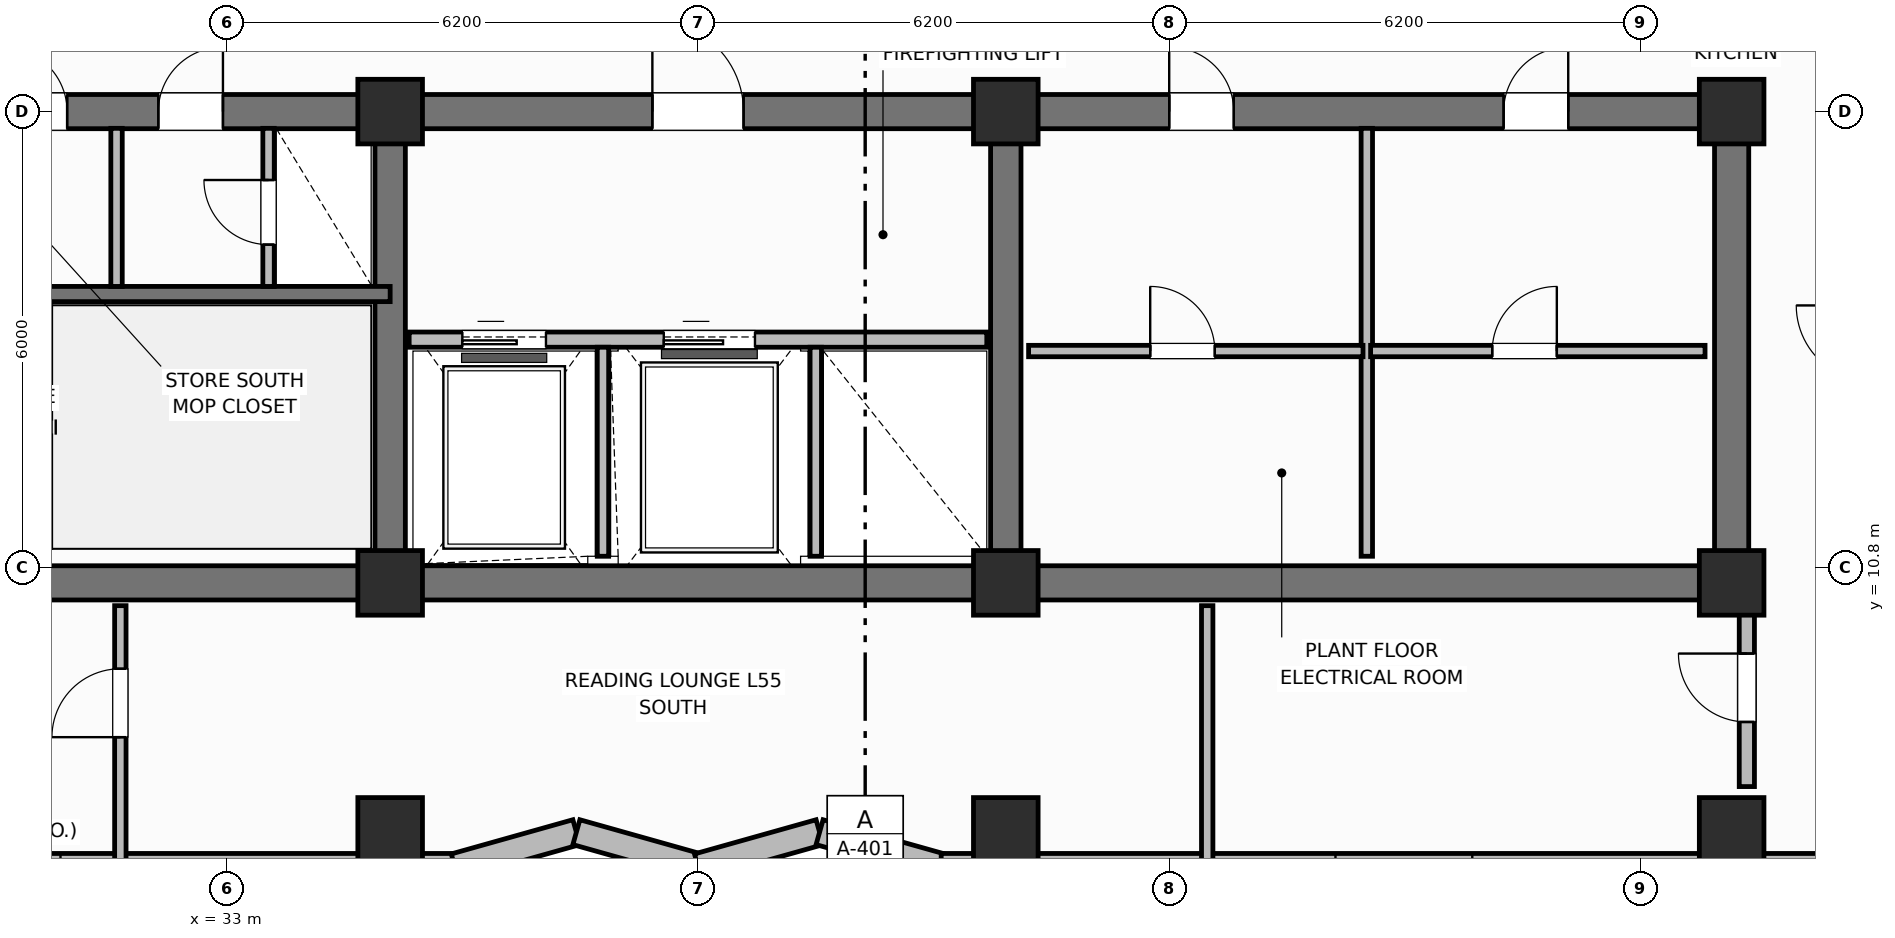
"""IFC4 building model, lengths in metres.
Left out: names, types, materials, properties, quantities, classifications, styles, units other than length and angle.
Written with IfcOpenShell. Run it as: python <this file> out.ifc"""

import sys

from ifc_helpers import new_model, si_unit, direction, frame, frame_2d, origin, origin_2d, place, context, subcontext, project, spatial, rectangle, extrude, element, fill, save


model = new_model("IFC4")
c1 = context("Model", 3, precision=1e-05, world=origin(), true_north=direction((0.0, 1.0)))
c2 = subcontext(c1, "Body", "Model", "MODEL_VIEW")
j1 = project(units=[si_unit("LENGTHUNIT", "METRE"), si_unit("PLANEANGLEUNIT", "RADIAN")], contexts=[c1])
p1 = place(None, origin())
s1 = spatial("IfcSite", under=j1, at=p1, CompositionType="ELEMENT")
p2 = place(p1, origin())
s2 = spatial("IfcBuilding", under=s1, at=p2, CompositionType="ELEMENT")
p3 = place(p2, frame((0.0, 0.0, 222.1)))
s3 = spatial("IfcBuildingStorey", under=s2, at=p3, CompositionType="ELEMENT", Elevation=222.1)
p4 = place(p3, frame((52.8, 10.6, 0.0), z_axis=(0.0, 0.0, 1.0), x_axis=(-1.0, 0.0, 0.0)))
e1 = element("IfcWall", 1, at=p4, inside=s3, PredefinedType="SHEAR", context=c2, shape_type="SweptSolid", body=[
    extrude(rectangle(XDim=27.2, YDim=0.45, at=frame_2d((13.6, 0.0))), origin(), (0.0, 0.0, 1.0), 3.7),
])
p5 = place(p3, frame((52.8, 10.825, 0.0), z_axis=(0.0, 0.0, 1.0), x_axis=(0.0, 1.0, 0.0)))
e2 = element("IfcWall", 2, at=p5, inside=s3, PredefinedType="SHEAR", context=c2, shape_type="SweptSolid", body=[
    extrude(rectangle(XDim=5.75, YDim=0.45, at=frame_2d((2.875, 0.0))), origin(), (0.0, 0.0, 1.0), 3.7),
])
p6 = place(p3, frame((25.6, 16.8, 0.0), z_axis=(0.0, 0.0, 1.0), x_axis=(1.0, 0.0, 0.0)))
e3 = element("IfcWall", 3, at=p6, inside=s3, PredefinedType="SHEAR", context=c2, shape_type="SweptSolid", body=[
    extrude(rectangle(XDim=27.2, YDim=0.45, at=frame_2d((13.6, 0.0))), origin(), (0.0, 0.0, 1.0), 3.7),
])
p7 = place(p6, frame((1.7, 0.0, 0.0)))
e4 = element("IfcOpeningElement", 4, at=p7, cuts=e3, PredefinedType="OPENING", context=c2, shape_type="SweptSolid", body=[
    extrude(rectangle(XDim=1.1, YDim=2.15, at=frame_2d((0.55, 1.075))), frame((0.0, 0.235, 0.0), z_axis=(0.0, -1.0, 0.0), x_axis=(1.0, 0.0, 0.0)), (0.0, 0.0, 1.0), 0.47),
])
p8 = place(p6, frame((4.45, 0.0, 0.0)))
e5 = element("IfcOpeningElement", 5, at=p8, cuts=e3, PredefinedType="OPENING", context=c2, shape_type="SweptSolid", body=[
    extrude(rectangle(XDim=0.85, YDim=2.1, at=frame_2d((0.425, 1.05))), frame((0.0, 0.235, 0.0), z_axis=(0.0, -1.0, 0.0), x_axis=(1.0, 0.0, 0.0)), (0.0, 0.0, 1.0), 0.47),
])
p9 = place(p6, frame((6.5, 0.0, 0.0)))
e6 = element("IfcOpeningElement", 6, at=p9, cuts=e3, PredefinedType="OPENING", context=c2, shape_type="SweptSolid", body=[
    extrude(rectangle(XDim=0.85, YDim=2.1, at=frame_2d((0.425, 1.05))), frame((0.0, 0.235, 0.0), z_axis=(0.0, -1.0, 0.0), x_axis=(1.0, 0.0, 0.0)), (0.0, 0.0, 1.0), 0.47),
])
p10 = place(p6, frame((13.0, 0.0, 0.0)))
e7 = element("IfcOpeningElement", 7, at=p10, cuts=e3, PredefinedType="OPENING", context=c2, shape_type="SweptSolid", body=[
    extrude(rectangle(XDim=1.2, YDim=2.15, at=frame_2d((0.6, 1.075))), frame((0.0, 0.235, 0.0), z_axis=(0.0, -1.0, 0.0), x_axis=(1.0, 0.0, 0.0)), (0.0, 0.0, 1.0), 0.47),
])
p11 = place(p6, frame((19.8, 0.0, 0.0)))
e8 = element("IfcOpeningElement", 8, at=p11, cuts=e3, PredefinedType="OPENING", context=c2, shape_type="SweptSolid", body=[
    extrude(rectangle(XDim=0.85, YDim=2.1, at=frame_2d((0.425, 1.05))), frame((0.0, 0.235, 0.0), z_axis=(0.0, -1.0, 0.0), x_axis=(1.0, 0.0, 0.0)), (0.0, 0.0, 1.0), 0.47),
])
p12 = place(p6, frame((24.2, 0.0, 0.0)))
e9 = element("IfcOpeningElement", 9, at=p12, cuts=e3, PredefinedType="OPENING", context=c2, shape_type="SweptSolid", body=[
    extrude(rectangle(XDim=0.85, YDim=2.1, at=frame_2d((0.425, 1.05))), frame((0.0, 0.235, 0.0), z_axis=(0.0, -1.0, 0.0), x_axis=(1.0, 0.0, 0.0)), (0.0, 0.0, 1.0), 0.47),
])
for number, where, z_axis, x_axis in (
    (10, (35.15, 10.825, 0.0), (0.0, 0.0, 1.0), (0.0, 1.0, 0.0)),
    (11, (43.25, 10.825, 0.0), (0.0, 0.0, 1.0), (0.0, 1.0, 0.0)),
):
    element("IfcWall", number, at=place(p3, frame(where, z_axis=z_axis, x_axis=x_axis)), inside=s3, PredefinedType="SHEAR", context=c2, shape_type="SweptSolid", body=[
        extrude(rectangle(XDim=5.75, YDim=0.4, at=frame_2d((2.875, 0.0))), origin(), (0.0, 0.0, 1.0), 3.7),
    ])
for number, where, z_axis, x_axis in (
    (12, (35.15, 10.6, 0.0), (0.0, 0.0, 1.0), (1.0, 0.0, 0.0)),
    (13, (35.15, 16.8, 0.0), (0.0, 0.0, 1.0), (1.0, 0.0, 0.0)),
    (14, (43.25, 10.6, 0.0), (0.0, 0.0, 1.0), (1.0, 0.0, 0.0)),
    (15, (43.25, 16.8, 0.0), (0.0, 0.0, 1.0), (1.0, 0.0, 0.0)),
    (16, (52.8, 10.6, 0.0), (0.0, 0.0, 1.0), (1.0, 0.0, 0.0)),
    (17, (52.8, 16.8, 0.0), (0.0, 0.0, 1.0), (1.0, 0.0, 0.0)),
    (18, (35.15, 7.35, 0.0), (0.0, 0.0, 1.0), (1.0, 0.0, 0.0)),
    (19, (43.25, 7.35, 0.0), (0.0, 0.0, 1.0), (1.0, 0.0, 0.0)),
    (20, (52.8, 7.35, 0.0), (0.0, 0.0, 1.0), (1.0, 0.0, 0.0)),
):
    element("IfcColumn", number, at=place(p3, frame(where, z_axis=z_axis, x_axis=x_axis)), inside=s3, PredefinedType="COLUMN", context=c2, shape_type="SweptSolid", body=[
        extrude(rectangle(XDim=0.85, YDim=0.85, at=origin_2d()), origin(), (0.0, 0.0, 1.0), 3.7),
    ])
p13 = place(p3, frame((20.2, 6.87, 0.0), z_axis=(0.0, 0.0, 1.0), x_axis=(1.0, 0.0, 0.0)))
e21 = element("IfcWall", 21, at=p13, inside=s3, PredefinedType="SOLIDWALL", context=c2, shape_type="SweptSolid", body=[
    extrude(rectangle(XDim=15.8, YDim=0.34, at=frame_2d((7.9, 0.0))), origin(), (0.0, 0.0, 1.0), 2.26),
])
p14 = place(p13, frame((8.812, 0.0, 0.3)))
e22 = element("IfcOpeningElement", 22, at=p14, cuts=e21, PredefinedType="OPENING", context=c2, shape_type="SweptSolid", body=[
    extrude(rectangle(XDim=1.8, YDim=1.85, at=frame_2d((0.9, 0.925))), frame((0.0, 0.18, 0.0), z_axis=(0.0, -1.0, 0.0), x_axis=(1.0, 0.0, 0.0)), (0.0, 0.0, 1.0), 0.36),
])
p15 = place(p3, frame((36.0, 6.87, 0.0), z_axis=(0.0, 0.0, 1.0), x_axis=(0.962662902433, 0.270703040766, 0.0)))
e23 = element("IfcWall", 23, at=p15, inside=s3, PredefinedType="SOLIDWALL", context=c2, shape_type="SweptSolid", body=[
    extrude(rectangle(XDim=1.662, YDim=0.34, at=frame_2d((0.831, 0.0))), origin(), (0.0, 0.0, 1.0), 2.26),
])
p16 = place(p3, frame((37.6, 7.32, 0.0), z_axis=(0.0, 0.0, 1.0), x_axis=(0.962652136636, -0.270741322725, 0.0)))
e24 = element("IfcWall", 24, at=p16, inside=s3, PredefinedType="SOLIDWALL", context=c2, shape_type="SweptSolid", body=[
    extrude(rectangle(XDim=1.662, YDim=0.34, at=frame_2d((0.831, 0.0))), origin(), (0.0, 0.0, 1.0), 2.26),
])
p17 = place(p3, frame((39.2, 6.87, 0.0), z_axis=(0.0, 0.0, 1.0), x_axis=(0.962662902433, 0.270703040766, 0.0)))
e25 = element("IfcWall", 25, at=p17, inside=s3, PredefinedType="SOLIDWALL", context=c2, shape_type="SweptSolid", body=[
    extrude(rectangle(XDim=1.662, YDim=0.34, at=frame_2d((0.831, 0.0))), origin(), (0.0, 0.0, 1.0), 2.26),
])
p18 = place(p3, frame((40.8, 7.32, 0.0), z_axis=(0.0, 0.0, 1.0), x_axis=(0.962652136636, -0.270741322725, 0.0)))
e26 = element("IfcWall", 26, at=p18, inside=s3, PredefinedType="SOLIDWALL", context=c2, shape_type="SweptSolid", body=[
    extrude(rectangle(XDim=1.662, YDim=0.34, at=frame_2d((0.831, 0.0))), origin(), (0.0, 0.0, 1.0), 2.26),
])
p19 = place(p3, frame((42.4, 6.87, 0.0), z_axis=(0.0, 0.0, 1.0), x_axis=(1.0, 0.0, 0.0)))
e27 = element("IfcWall", 27, at=p19, inside=s3, PredefinedType="SOLIDWALL", context=c2, shape_type="SweptSolid", body=[
    extrude(rectangle(XDim=15.8, YDim=0.34, at=frame_2d((7.9, 0.0))), origin(), (0.0, 0.0, 1.0), 2.26),
])
p20 = place(p19, frame((5.188, 0.0, 0.3)))
e28 = element("IfcOpeningElement", 28, at=p20, cuts=e27, PredefinedType="OPENING", context=c2, shape_type="SweptSolid", body=[
    extrude(rectangle(XDim=1.8, YDim=1.85, at=frame_2d((0.9, 0.925))), frame((0.0, 0.18, 0.0), z_axis=(0.0, -1.0, 0.0), x_axis=(1.0, 0.0, 0.0)), (0.0, 0.0, 1.0), 0.36),
])
p21 = place(p19, frame((12.788, 0.0, 0.3)))
e29 = element("IfcOpeningElement", 29, at=p21, cuts=e27, PredefinedType="OPENING", context=c2, shape_type="SweptSolid", body=[
    extrude(rectangle(XDim=1.8, YDim=1.85, at=frame_2d((0.9, 0.925))), frame((0.0, 0.18, 0.0), z_axis=(0.0, -1.0, 0.0), x_axis=(1.0, 0.0, 0.0)), (0.0, 0.0, 1.0), 0.36),
])
p22 = place(p3, frame((25.6, 14.4, 0.0), z_axis=(0.0, 0.0, 1.0), x_axis=(1.0, 0.0, 0.0)))
e30 = element("IfcWall", 30, at=p22, inside=s3, PredefinedType="SHEAR", context=c2, shape_type="SweptSolid", body=[
    extrude(rectangle(XDim=9.55, YDim=0.2, at=frame_2d((4.775, 0.0))), origin(), (0.0, 0.0, 1.0), 3.7),
])
p23 = place(p22, frame((1.05, 0.0, 0.0)))
e31 = element("IfcOpeningElement", 31, at=p23, cuts=e30, PredefinedType="OPENING", context=c2, shape_type="SweptSolid", body=[
    extrude(rectangle(XDim=1.1, YDim=2.15, at=frame_2d((0.55, 1.075))), frame((0.0, 0.11, 0.0), z_axis=(0.0, -1.0, 0.0), x_axis=(1.0, 0.0, 0.0)), (0.0, 0.0, 1.0), 0.22),
])
p24 = place(p3, frame((31.55, 14.5, 0.0), z_axis=(0.0, 0.0, 1.0), x_axis=(0.0, 1.0, 0.0)))
e32 = element("IfcWall", 32, at=p24, inside=s3, PredefinedType="PARTITIONING", context=c2, shape_type="SweptSolid", body=[
    extrude(rectangle(XDim=2.08, YDim=0.15, at=frame_2d((1.04, 0.0))), origin(), (0.0, 0.0, 1.0), 2.24),
])
p25 = place(p3, frame((33.55, 14.5, 0.0), z_axis=(0.0, 0.0, 1.0), x_axis=(0.0, 1.0, 0.0)))
e33 = element("IfcWall", 33, at=p25, inside=s3, PredefinedType="PARTITIONING", context=c2, shape_type="SweptSolid", body=[
    extrude(rectangle(XDim=2.08, YDim=0.15, at=frame_2d((1.04, 0.0))), origin(), (0.0, 0.0, 1.0), 2.24),
])
p26 = place(p25, frame((0.55, 0.0, 0.0)))
e34 = element("IfcOpeningElement", 34, at=p26, cuts=e33, PredefinedType="OPENING", context=c2, shape_type="SweptSolid", body=[
    extrude(rectangle(XDim=0.85, YDim=2.05, at=frame_2d((0.425, 1.025))), frame((0.0, 0.085, 0.0), z_axis=(0.0, -1.0, 0.0), x_axis=(1.0, 0.0, 0.0)), (0.0, 0.0, 1.0), 0.17),
])
p27 = place(p3, frame((35.4, 13.8, 0.0), z_axis=(0.0, 0.0, 1.0), x_axis=(1.0, 0.0, 0.0)))
e35 = element("IfcWall", 35, at=p27, inside=s3, PredefinedType="PARTITIONING", context=c2, shape_type="SweptSolid", body=[
    extrude(rectangle(XDim=7.6, YDim=0.2, at=frame_2d((3.8, 0.0))), origin(), (0.0, 0.0, 1.0), 2.18),
])
p28 = place(p27, frame((0.7, 0.0, 0.0)))
e36 = element("IfcOpeningElement", 36, at=p28, cuts=e35, PredefinedType="OPENING", context=c2, shape_type="SweptSolid", body=[
    extrude(rectangle(XDim=1.1, YDim=2.15, at=frame_2d((0.55, 1.075))), frame((0.0, 0.11, 0.0), z_axis=(0.0, -1.0, 0.0), x_axis=(1.0, 0.0, 0.0)), (0.0, 0.0, 1.0), 0.22),
])
p29 = place(p27, frame((3.35, 0.0, 0.0)))
e37 = element("IfcOpeningElement", 37, at=p29, cuts=e35, PredefinedType="OPENING", context=c2, shape_type="SweptSolid", body=[
    extrude(rectangle(XDim=1.2, YDim=2.15, at=frame_2d((0.6, 1.075))), frame((0.0, 0.11, 0.0), z_axis=(0.0, -1.0, 0.0), x_axis=(1.0, 0.0, 0.0)), (0.0, 0.0, 1.0), 0.22),
])
for number, where, z_axis, x_axis in (
    (38, (37.95, 10.95, 0.0), (0.0, 0.0, 1.0), (0.0, 1.0, 0.0)),
    (39, (40.75, 10.95, 0.0), (0.0, 0.0, 1.0), (0.0, 1.0, 0.0)),
):
    element("IfcWall", number, at=place(p3, frame(where, z_axis=z_axis, x_axis=x_axis)), inside=s3, PredefinedType="PARTITIONING", context=c2, shape_type="SweptSolid", body=[
        extrude(rectangle(XDim=2.75, YDim=0.15, at=frame_2d((1.375, 0.0))), origin(), (0.0, 0.0, 1.0), 2.24),
    ])
p30 = place(p3, frame((48.0, 10.95, 0.0), z_axis=(0.0, 0.0, 1.0), x_axis=(0.0, 1.0, 0.0)))
e40 = element("IfcWall", 40, at=p30, inside=s3, PredefinedType="PARTITIONING", context=c2, shape_type="SweptSolid", body=[
    extrude(rectangle(XDim=5.63, YDim=0.15, at=frame_2d((2.815, 0.0))), origin(), (0.0, 0.0, 1.0), 2.24),
])
p31 = place(p3, frame((43.55, 13.65, 0.0), z_axis=(0.0, 0.0, 1.0), x_axis=(1.0, 0.0, 0.0)))
e41 = element("IfcWall", 41, at=p31, inside=s3, PredefinedType="PARTITIONING", context=c2, shape_type="SweptSolid", body=[
    extrude(rectangle(XDim=4.4, YDim=0.15, at=frame_2d((2.2, 0.0))), origin(), (0.0, 0.0, 1.0), 2.24),
])
p32 = place(p31, frame((1.6, 0.0, 0.0)))
e42 = element("IfcOpeningElement", 42, at=p32, cuts=e41, PredefinedType="OPENING", context=c2, shape_type="SweptSolid", body=[
    extrude(rectangle(XDim=0.85, YDim=2.1, at=frame_2d((0.425, 1.05))), frame((0.0, 0.085, 0.0), z_axis=(0.0, -1.0, 0.0), x_axis=(1.0, 0.0, 0.0)), (0.0, 0.0, 1.0), 0.17),
])
p33 = place(p3, frame((48.05, 13.65, 0.0), z_axis=(0.0, 0.0, 1.0), x_axis=(1.0, 0.0, 0.0)))
e43 = element("IfcWall", 43, at=p33, inside=s3, PredefinedType="PARTITIONING", context=c2, shape_type="SweptSolid", body=[
    extrude(rectangle(XDim=4.4, YDim=0.15, at=frame_2d((2.2, 0.0))), origin(), (0.0, 0.0, 1.0), 2.24),
])
p34 = place(p33, frame((1.6, 0.0, 0.0)))
e44 = element("IfcOpeningElement", 44, at=p34, cuts=e43, PredefinedType="OPENING", context=c2, shape_type="SweptSolid", body=[
    extrude(rectangle(XDim=0.85, YDim=2.1, at=frame_2d((0.425, 1.05))), frame((0.0, 0.085, 0.0), z_axis=(0.0, -1.0, 0.0), x_axis=(1.0, 0.0, 0.0)), (0.0, 0.0, 1.0), 0.17),
])
p35 = place(p3, frame((31.6, 6.87, 0.0), z_axis=(0.0, 0.0, 1.0), x_axis=(0.0, 1.0, 0.0)))
e45 = element("IfcWall", 45, at=p35, inside=s3, PredefinedType="PARTITIONING", context=c2, shape_type="SweptSolid", body=[
    extrude(rectangle(XDim=3.43, YDim=0.15, at=frame_2d((1.715, 0.0))), origin(), (0.0, 0.0, 1.0), 2.24),
])
p36 = place(p35, frame((1.7, 0.0, 0.0)))
e46 = element("IfcOpeningElement", 46, at=p36, cuts=e45, PredefinedType="OPENING", context=c2, shape_type="SweptSolid", body=[
    extrude(rectangle(XDim=0.9, YDim=2.1, at=frame_2d((0.45, 1.05))), frame((0.0, 0.085, 0.0), z_axis=(0.0, -1.0, 0.0), x_axis=(1.0, 0.0, 0.0)), (0.0, 0.0, 1.0), 0.17),
])
p37 = place(p3, frame((45.9, 6.87, 0.0), z_axis=(0.0, 0.0, 1.0), x_axis=(0.0, 1.0, 0.0)))
e47 = element("IfcWall", 47, at=p37, inside=s3, PredefinedType="PARTITIONING", context=c2, shape_type="SweptSolid", body=[
    extrude(rectangle(XDim=3.43, YDim=0.15, at=frame_2d((1.715, 0.0))), origin(), (0.0, 0.0, 1.0), 2.24),
])
p38 = place(p3, frame((53.0, 7.92, 0.0), z_axis=(0.0, 0.0, 1.0), x_axis=(0.0, 1.0, 0.0)))
e48 = element("IfcWall", 48, at=p38, inside=s3, PredefinedType="PARTITIONING", context=c2, shape_type="SweptSolid", body=[
    extrude(rectangle(XDim=2.38, YDim=0.2, at=frame_2d((1.19, 0.0))), origin(), (0.0, 0.0, 1.0), 2.24),
])
p39 = place(p38, frame((0.85, 0.0, 0.0)))
e49 = element("IfcOpeningElement", 49, at=p39, cuts=e48, PredefinedType="OPENING", context=c2, shape_type="SweptSolid", body=[
    extrude(rectangle(XDim=0.9, YDim=2.1, at=frame_2d((0.45, 1.05))), frame((0.0, 0.11, 0.0), z_axis=(0.0, -1.0, 0.0), x_axis=(1.0, 0.0, 0.0)), (0.0, 0.0, 1.0), 0.22),
])
p40 = place(p26, origin())
e50 = element("IfcDoor", 50, at=p40, inside=s3, OperationType="SINGLE_SWING_RIGHT", PredefinedType="TRAPDOOR", context=c2, shape_type="SweptSolid", body=[
    extrude(rectangle(XDim=0.85, YDim=2.05, at=frame_2d((0.425, 1.025))), frame((0.0, 0.025, 0.0), z_axis=(0.0, -1.0, 0.0), x_axis=(1.0, 0.0, 0.0)), (0.0, 0.0, 1.0), 0.05),
])
fill(e34, e50)
p41 = place(p28, origin())
e51 = element("IfcDoor", 51, at=p41, inside=s3, OperationType="SLIDING_TO_LEFT", PredefinedType="DOOR", context=c2, shape_type="SweptSolid", body=[
    extrude(rectangle(XDim=1.1, YDim=2.15, at=frame_2d((0.55, 1.075))), frame((0.0, 0.025, 0.0), z_axis=(0.0, -1.0, 0.0), x_axis=(1.0, 0.0, 0.0)), (0.0, 0.0, 1.0), 0.05),
])
fill(e36, e51)
p42 = place(p29, origin())
e52 = element("IfcDoor", 52, at=p42, inside=s3, OperationType="SLIDING_TO_LEFT", PredefinedType="DOOR", context=c2, shape_type="SweptSolid", body=[
    extrude(rectangle(XDim=1.2, YDim=2.15, at=frame_2d((0.6, 1.075))), frame((0.0, 0.025, 0.0), z_axis=(0.0, -1.0, 0.0), x_axis=(1.0, 0.0, 0.0)), (0.0, 0.0, 1.0), 0.05),
])
fill(e37, e52)
p43 = place(p32, origin())
e53 = element("IfcDoor", 53, at=p43, inside=s3, OperationType="SINGLE_SWING_LEFT", PredefinedType="DOOR", context=c2, shape_type="SweptSolid", body=[
    extrude(rectangle(XDim=0.85, YDim=2.1, at=frame_2d((0.425, 1.05))), frame((0.0, 0.025, 0.0), z_axis=(0.0, -1.0, 0.0), x_axis=(1.0, 0.0, 0.0)), (0.0, 0.0, 1.0), 0.05),
])
fill(e42, e53)
p44 = place(p34, origin())
e54 = element("IfcDoor", 54, at=p44, inside=s3, OperationType="SINGLE_SWING_RIGHT", PredefinedType="DOOR", context=c2, shape_type="SweptSolid", body=[
    extrude(rectangle(XDim=0.85, YDim=2.1, at=frame_2d((0.425, 1.05))), frame((0.0, 0.025, 0.0), z_axis=(0.0, -1.0, 0.0), x_axis=(1.0, 0.0, 0.0)), (0.0, 0.0, 1.0), 0.05),
])
fill(e44, e54)
p45 = place(p36, origin())
e55 = element("IfcDoor", 55, at=p45, inside=s3, OperationType="SINGLE_SWING_LEFT", PredefinedType="DOOR", context=c2, shape_type="SweptSolid", body=[
    extrude(rectangle(XDim=0.9, YDim=2.1, at=frame_2d((0.45, 1.05))), frame((0.0, 0.025, 0.0), z_axis=(0.0, -1.0, 0.0), x_axis=(1.0, 0.0, 0.0)), (0.0, 0.0, 1.0), 0.05),
])
fill(e46, e55)
p46 = place(p39, origin())
e56 = element("IfcDoor", 56, at=p46, inside=s3, OperationType="SINGLE_SWING_RIGHT", PredefinedType="DOOR", context=c2, shape_type="SweptSolid", body=[
    extrude(rectangle(XDim=0.9, YDim=2.1, at=frame_2d((0.45, 1.05))), frame((0.0, 0.025, 0.0), z_axis=(0.0, -1.0, 0.0), x_axis=(1.0, 0.0, 0.0)), (0.0, 0.0, 1.0), 0.05),
])
fill(e49, e56)
p47 = place(p8, origin())
e57 = element("IfcDoor", 57, at=p47, inside=s3, OperationType="SINGLE_SWING_LEFT", PredefinedType="DOOR", context=c2, shape_type="SweptSolid", body=[
    extrude(rectangle(XDim=0.85, YDim=2.1, at=frame_2d((0.425, 1.05))), frame((0.0, 0.025, 0.0), z_axis=(0.0, -1.0, 0.0), x_axis=(1.0, 0.0, 0.0)), (0.0, 0.0, 1.0), 0.05),
])
fill(e5, e57)
p48 = place(p9, origin())
e58 = element("IfcDoor", 58, at=p48, inside=s3, OperationType="SINGLE_SWING_RIGHT", PredefinedType="DOOR", context=c2, shape_type="SweptSolid", body=[
    extrude(rectangle(XDim=0.85, YDim=2.1, at=frame_2d((0.425, 1.05))), frame((0.0, 0.025, 0.0), z_axis=(0.0, -1.0, 0.0), x_axis=(1.0, 0.0, 0.0)), (0.0, 0.0, 1.0), 0.05),
])
fill(e6, e58)
p49 = place(p10, origin())
e59 = element("IfcDoor", 59, at=p49, inside=s3, OperationType="SINGLE_SWING_LEFT", PredefinedType="DOOR", context=c2, shape_type="SweptSolid", body=[
    extrude(rectangle(XDim=1.2, YDim=2.15, at=frame_2d((0.6, 1.075))), frame((0.0, 0.025, 0.0), z_axis=(0.0, -1.0, 0.0), x_axis=(1.0, 0.0, 0.0)), (0.0, 0.0, 1.0), 0.05),
])
fill(e7, e59)
p50 = place(p11, origin())
e60 = element("IfcDoor", 60, at=p50, inside=s3, OperationType="SINGLE_SWING_LEFT", PredefinedType="DOOR", context=c2, shape_type="SweptSolid", body=[
    extrude(rectangle(XDim=0.85, YDim=2.1, at=frame_2d((0.425, 1.05))), frame((0.0, 0.025, 0.0), z_axis=(0.0, -1.0, 0.0), x_axis=(1.0, 0.0, 0.0)), (0.0, 0.0, 1.0), 0.05),
])
fill(e8, e60)
p51 = place(p12, origin())
e61 = element("IfcDoor", 61, at=p51, inside=s3, OperationType="SINGLE_SWING_RIGHT", PredefinedType="DOOR", context=c2, shape_type="SweptSolid", body=[
    extrude(rectangle(XDim=0.85, YDim=2.1, at=frame_2d((0.425, 1.05))), frame((0.0, 0.025, 0.0), z_axis=(0.0, -1.0, 0.0), x_axis=(1.0, 0.0, 0.0)), (0.0, 0.0, 1.0), 0.05),
])
fill(e9, e61)
save(model, sys.argv[1])
